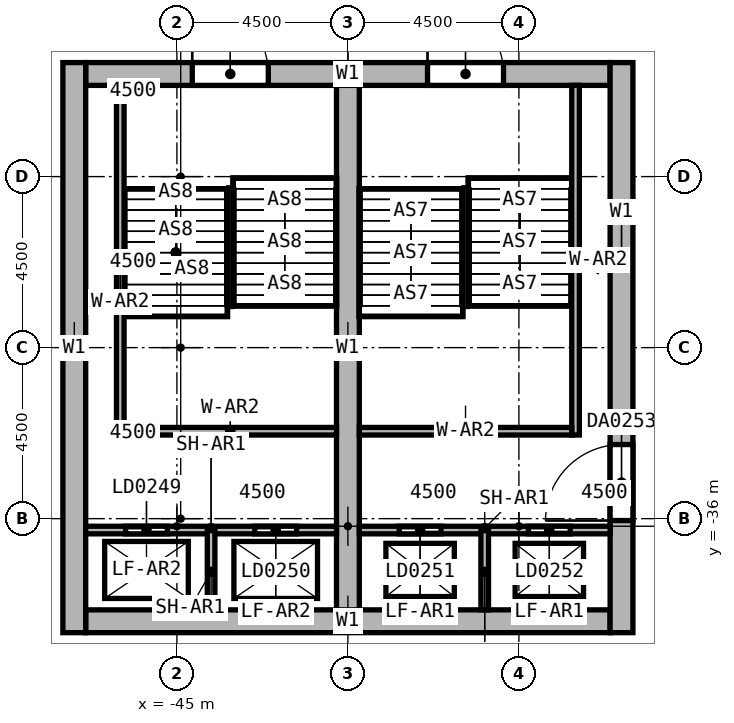
"""IFC4 building model, lengths in metres.
Left out: names, types, materials, properties, quantities, classifications, styles, units other than length and angle.
Written with IfcOpenShell. Run it as: python <this file> out.ifc"""

import sys

from ifc_helpers import new_model, si_unit, direction, frame, frame_2d, origin, place, context, subcontext, project, spatial, rectangle, extrude, element, fill, save


model = new_model("IFC4")
c1 = context("Model", 3, precision=1e-05, world=origin(), true_north=direction((0.0, 1.0)))
c2 = subcontext(c1, "Body", "Model", "MODEL_VIEW")
j1 = project(units=[si_unit("LENGTHUNIT", "METRE"), si_unit("PLANEANGLEUNIT", "RADIAN")], contexts=[c1])
p1 = place(None, origin())
s1 = spatial("IfcSite", under=j1, at=p1, CompositionType="ELEMENT")
p2 = place(p1, origin())
s2 = spatial("IfcBuilding", under=s1, at=p2, CompositionType="ELEMENT")
p3 = place(p2, origin())
s3 = spatial("IfcBuildingStorey", under=s2, at=p3, CompositionType="ELEMENT", Elevation=0.0)
p4 = place(p3, frame((-47.4, -24.3, 0.0), z_axis=(0.0, 0.0, 1.0), x_axis=(1.0, 0.0, 0.0)))
e1 = element("IfcWall", 1, at=p4, inside=s3, PredefinedType="SHEAR", context=c2, shape_type="SweptSolid", body=[
    extrude(rectangle(XDim=13.8, YDim=0.6, at=frame_2d((6.9, 0.0))), origin(), (0.0, 0.0, 1.0), 12.0),
])
p5 = place(p4, frame((8.995, 0.0, 0.0)))
e2 = element("IfcOpeningElement", 2, at=p5, cuts=e1, PredefinedType="OPENING", context=c2, shape_type="SweptSolid", body=[
    extrude(rectangle(XDim=2.0, YDim=2.4, at=frame_2d((1.0, 1.2))), frame((0.0, 0.3, 0.0), z_axis=(0.0, -1.0, 0.0), x_axis=(1.0, 0.0, 0.0)), (0.0, 0.0, 1.0), 0.6),
])
p6 = place(p4, frame((2.805, 0.0, 0.0)))
e3 = element("IfcOpeningElement", 3, at=p6, cuts=e1, PredefinedType="OPENING", context=c2, shape_type="SweptSolid", body=[
    extrude(rectangle(XDim=2.0, YDim=2.4, at=frame_2d((1.0, 1.2))), frame((0.0, 0.3, 0.0), z_axis=(0.0, -1.0, 0.0), x_axis=(1.0, 0.0, 0.0)), (0.0, 0.0, 1.0), 0.6),
])
p7 = place(p3, frame((-47.4, -38.7, 0.0), z_axis=(0.0, 0.0, 1.0), x_axis=(1.0, 0.0, 0.0)))
e4 = element("IfcWall", 4, at=p7, inside=s3, PredefinedType="SHEAR", context=c2, shape_type="SweptSolid", body=[
    extrude(rectangle(XDim=13.8, YDim=0.6, at=frame_2d((6.9, 0.0))), origin(), (0.0, 0.0, 1.0), 12.0),
])
p8 = place(p3, frame((-47.7, -39.0, 0.0), z_axis=(0.0, 0.0, 1.0), x_axis=(0.0, 1.0, 0.0)))
e5 = element("IfcWall", 5, at=p8, inside=s3, PredefinedType="SHEAR", context=c2, shape_type="SweptSolid", body=[
    extrude(rectangle(XDim=15.0, YDim=0.6, at=frame_2d((7.5, 0.0))), origin(), (0.0, 0.0, 1.0), 12.0),
])
p9 = place(p3, frame((-33.3, -39.0, 0.0), z_axis=(0.0, 0.0, 1.0), x_axis=(0.0, 1.0, 0.0)))
e6 = element("IfcWall", 6, at=p9, inside=s3, PredefinedType="SHEAR", context=c2, shape_type="SweptSolid", body=[
    extrude(rectangle(XDim=15.0, YDim=0.6, at=frame_2d((7.5, 0.0))), origin(), (0.0, 0.0, 1.0), 12.0),
])
p10 = place(p9, frame((2.95, 0.0, 0.0)))
e7 = element("IfcOpeningElement", 7, at=p10, cuts=e6, PredefinedType="OPENING", context=c2, shape_type="SweptSolid", body=[
    extrude(rectangle(XDim=2.0, YDim=2.4, at=frame_2d((1.0, 1.2))), frame((0.0, 0.3, 0.0), z_axis=(0.0, -1.0, 0.0), x_axis=(1.0, 0.0, 0.0)), (0.0, 0.0, 1.0), 0.6),
])
p11 = place(p3, frame((-40.5, -38.4, 0.0), z_axis=(0.0, 0.0, 1.0), x_axis=(0.0, 1.0, 0.0)))
e8 = element("IfcWall", 8, at=p11, inside=s3, PredefinedType="SHEAR", context=c2, shape_type="SweptSolid", body=[
    extrude(rectangle(XDim=13.8, YDim=0.6, at=frame_2d((6.9, 0.0))), origin(), (0.0, 0.0, 1.0), 12.0),
])
p12 = place(p3, frame((-34.51, -33.8, 0.0), z_axis=(0.0, 0.0, 1.0), x_axis=(0.0, 1.0, 0.0)))
e9 = element("IfcWall", 9, at=p12, inside=s3, PredefinedType="SOLIDWALL", context=c2, shape_type="SweptSolid", body=[
    extrude(rectangle(XDim=9.2, YDim=0.2, at=frame_2d((4.6, 0.0))), origin(), (0.0, 0.0, 1.0), 12.0),
])
p13 = place(p3, frame((-40.2, -33.7, 0.0), z_axis=(0.0, 0.0, 1.0), x_axis=(1.0, 0.0, 0.0)))
e10 = element("IfcWall", 10, at=p13, inside=s3, PredefinedType="SOLIDWALL", context=c2, shape_type="SweptSolid", body=[
    extrude(rectangle(XDim=5.59, YDim=0.2, at=frame_2d((2.795, 0.0))), origin(), (0.0, 0.0, 1.0), 12.0),
])
p14 = place(p3, frame((-46.49, -33.8, 0.0), z_axis=(0.0, 0.0, 1.0), x_axis=(0.0, 1.0, 0.0)))
e11 = element("IfcWall", 11, at=p14, inside=s3, PredefinedType="SOLIDWALL", context=c2, shape_type="SweptSolid", body=[
    extrude(rectangle(XDim=9.2, YDim=0.2, at=frame_2d((4.6, 0.0))), origin(), (0.0, 0.0, 1.0), 12.0),
])
p15 = place(p3, frame((-46.39, -33.7, 0.0), z_axis=(0.0, 0.0, 1.0), x_axis=(1.0, 0.0, 0.0)))
e12 = element("IfcWall", 12, at=p15, inside=s3, PredefinedType="SOLIDWALL", context=c2, shape_type="SweptSolid", body=[
    extrude(rectangle(XDim=5.59, YDim=0.2, at=frame_2d((2.795, 0.0))), origin(), (0.0, 0.0, 1.0), 12.0),
])
p16 = place(p3, frame((-47.4, -36.3, 0.0), z_axis=(0.0, 0.0, 1.0), x_axis=(1.0, 0.0, 0.0)))
e13 = element("IfcWall", 13, at=p16, inside=s3, PredefinedType="SHEAR", context=c2, shape_type="SweptSolid", body=[
    extrude(rectangle(XDim=6.6, YDim=0.2, at=frame_2d((3.3, 0.0))), origin(), (0.0, 0.0, 1.0), 12.0),
])
p17 = place(p16, frame((1.05, 0.0, 0.0)))
e14 = element("IfcOpeningElement", 14, at=p17, cuts=e13, PredefinedType="OPENING", context=c2, shape_type="SweptSolid", body=[
    extrude(rectangle(XDim=1.1, YDim=2.4, at=frame_2d((0.55, 1.2))), frame((0.0, 0.1, 0.0), z_axis=(0.0, -1.0, 0.0), x_axis=(1.0, 0.0, 0.0)), (0.0, 0.0, 1.0), 0.2),
])
p18 = place(p16, frame((4.45, 0.0, 0.0)))
e15 = element("IfcOpeningElement", 15, at=p18, cuts=e13, PredefinedType="OPENING", context=c2, shape_type="SweptSolid", body=[
    extrude(rectangle(XDim=1.1, YDim=2.4, at=frame_2d((0.55, 1.2))), frame((0.0, 0.1, 0.0), z_axis=(0.0, -1.0, 0.0), x_axis=(1.0, 0.0, 0.0)), (0.0, 0.0, 1.0), 0.2),
])
p19 = place(p3, frame((-40.2, -36.3, 0.0), z_axis=(0.0, 0.0, 1.0), x_axis=(1.0, 0.0, 0.0)))
e16 = element("IfcWall", 16, at=p19, inside=s3, PredefinedType="SHEAR", context=c2, shape_type="SweptSolid", body=[
    extrude(rectangle(XDim=6.6, YDim=0.2, at=frame_2d((3.3, 0.0))), origin(), (0.0, 0.0, 1.0), 12.0),
])
p20 = place(p19, frame((1.05, 0.0, 0.0)))
e17 = element("IfcOpeningElement", 17, at=p20, cuts=e16, PredefinedType="OPENING", context=c2, shape_type="SweptSolid", body=[
    extrude(rectangle(XDim=1.1, YDim=2.4, at=frame_2d((0.55, 1.2))), frame((0.0, 0.1, 0.0), z_axis=(0.0, -1.0, 0.0), x_axis=(1.0, 0.0, 0.0)), (0.0, 0.0, 1.0), 0.2),
])
p21 = place(p19, frame((4.45, 0.0, 0.0)))
e18 = element("IfcOpeningElement", 18, at=p21, cuts=e16, PredefinedType="OPENING", context=c2, shape_type="SweptSolid", body=[
    extrude(rectangle(XDim=1.1, YDim=2.4, at=frame_2d((0.55, 1.2))), frame((0.0, 0.1, 0.0), z_axis=(0.0, -1.0, 0.0), x_axis=(1.0, 0.0, 0.0)), (0.0, 0.0, 1.0), 0.2),
])
for number, where, z_axis, x_axis in (
    (19, (-36.9, -38.4, 0.0), (0.0, 0.0, 1.0), (0.0, 1.0, 0.0)),
    (20, (-44.1, -38.4, 0.0), (0.0, 0.0, 1.0), (0.0, 1.0, 0.0)),
):
    element("IfcWall", number, at=place(p3, frame(where, z_axis=z_axis, x_axis=x_axis)), inside=s3, PredefinedType="SHEAR", context=c2, shape_type="SweptSolid", body=[
        extrude(rectangle(XDim=2.1, YDim=0.2, at=frame_2d((1.05, 0.0))), origin(), (0.0, 0.0, 1.0), 12.0),
    ])
p22 = place(p5, origin())
e21 = element("IfcDoor", 21, at=p22, inside=s3, OperationType="DOUBLE_DOOR_SINGLE_SWING", PredefinedType="DOOR", context=c2, shape_type="SweptSolid", body=[
    extrude(rectangle(XDim=2.0, YDim=2.4, at=frame_2d((1.0, 1.2))), frame((0.0, 0.025, 0.0), z_axis=(0.0, -1.0, 0.0), x_axis=(1.0, 0.0, 0.0)), (0.0, 0.0, 1.0), 0.05),
])
fill(e2, e21)
p23 = place(p6, origin())
e22 = element("IfcDoor", 22, at=p23, inside=s3, OperationType="DOUBLE_DOOR_SINGLE_SWING", PredefinedType="DOOR", context=c2, shape_type="SweptSolid", body=[
    extrude(rectangle(XDim=2.0, YDim=2.4, at=frame_2d((1.0, 1.2))), frame((0.0, 0.025, 0.0), z_axis=(0.0, -1.0, 0.0), x_axis=(1.0, 0.0, 0.0)), (0.0, 0.0, 1.0), 0.05),
])
fill(e3, e22)
p24 = place(p17, frame((1.1, 0.0, 0.0), z_axis=(0.0, 0.0, 1.0), x_axis=(-1.0, 0.0, 0.0)))
e23 = element("IfcDoor", 23, at=p24, inside=s3, OperationType="DOUBLE_DOOR_SLIDING", PredefinedType="DOOR", context=c2, shape_type="SweptSolid", body=[
    extrude(rectangle(XDim=1.1, YDim=2.4, at=frame_2d((0.55, 1.2))), frame((0.0, 0.025, 0.0), z_axis=(0.0, -1.0, 0.0), x_axis=(1.0, 0.0, 0.0)), (0.0, 0.0, 1.0), 0.05),
])
fill(e14, e23)
p25 = place(p18, frame((1.1, 0.0, 0.0), z_axis=(0.0, 0.0, 1.0), x_axis=(-1.0, 0.0, 0.0)))
e24 = element("IfcDoor", 24, at=p25, inside=s3, OperationType="DOUBLE_DOOR_SLIDING", PredefinedType="DOOR", context=c2, shape_type="SweptSolid", body=[
    extrude(rectangle(XDim=1.1, YDim=2.4, at=frame_2d((0.55, 1.2))), frame((0.0, 0.025, 0.0), z_axis=(0.0, -1.0, 0.0), x_axis=(1.0, 0.0, 0.0)), (0.0, 0.0, 1.0), 0.05),
])
fill(e15, e24)
p26 = place(p20, frame((1.1, 0.0, 0.0), z_axis=(0.0, 0.0, 1.0), x_axis=(-1.0, 0.0, 0.0)))
e25 = element("IfcDoor", 25, at=p26, inside=s3, OperationType="DOUBLE_DOOR_SLIDING", PredefinedType="DOOR", context=c2, shape_type="SweptSolid", body=[
    extrude(rectangle(XDim=1.1, YDim=2.4, at=frame_2d((0.55, 1.2))), frame((0.0, 0.025, 0.0), z_axis=(0.0, -1.0, 0.0), x_axis=(1.0, 0.0, 0.0)), (0.0, 0.0, 1.0), 0.05),
])
fill(e17, e25)
p27 = place(p21, frame((1.1, 0.0, 0.0), z_axis=(0.0, 0.0, 1.0), x_axis=(-1.0, 0.0, 0.0)))
e26 = element("IfcDoor", 26, at=p27, inside=s3, OperationType="DOUBLE_DOOR_SLIDING", PredefinedType="DOOR", context=c2, shape_type="SweptSolid", body=[
    extrude(rectangle(XDim=1.1, YDim=2.4, at=frame_2d((0.55, 1.2))), frame((0.0, 0.025, 0.0), z_axis=(0.0, -1.0, 0.0), x_axis=(1.0, 0.0, 0.0)), (0.0, 0.0, 1.0), 0.05),
])
fill(e18, e26)
p28 = place(p10, origin())
e27 = element("IfcDoor", 27, at=p28, inside=s3, OperationType="DOUBLE_DOOR_SINGLE_SWING", PredefinedType="DOOR", context=c2, shape_type="SweptSolid", body=[
    extrude(rectangle(XDim=2.0, YDim=2.4, at=frame_2d((1.0, 1.2))), frame((0.0, 0.025, 0.0), z_axis=(0.0, -1.0, 0.0), x_axis=(1.0, 0.0, 0.0)), (0.0, 0.0, 1.0), 0.05),
])
fill(e7, e27)
save(model, sys.argv[1])
